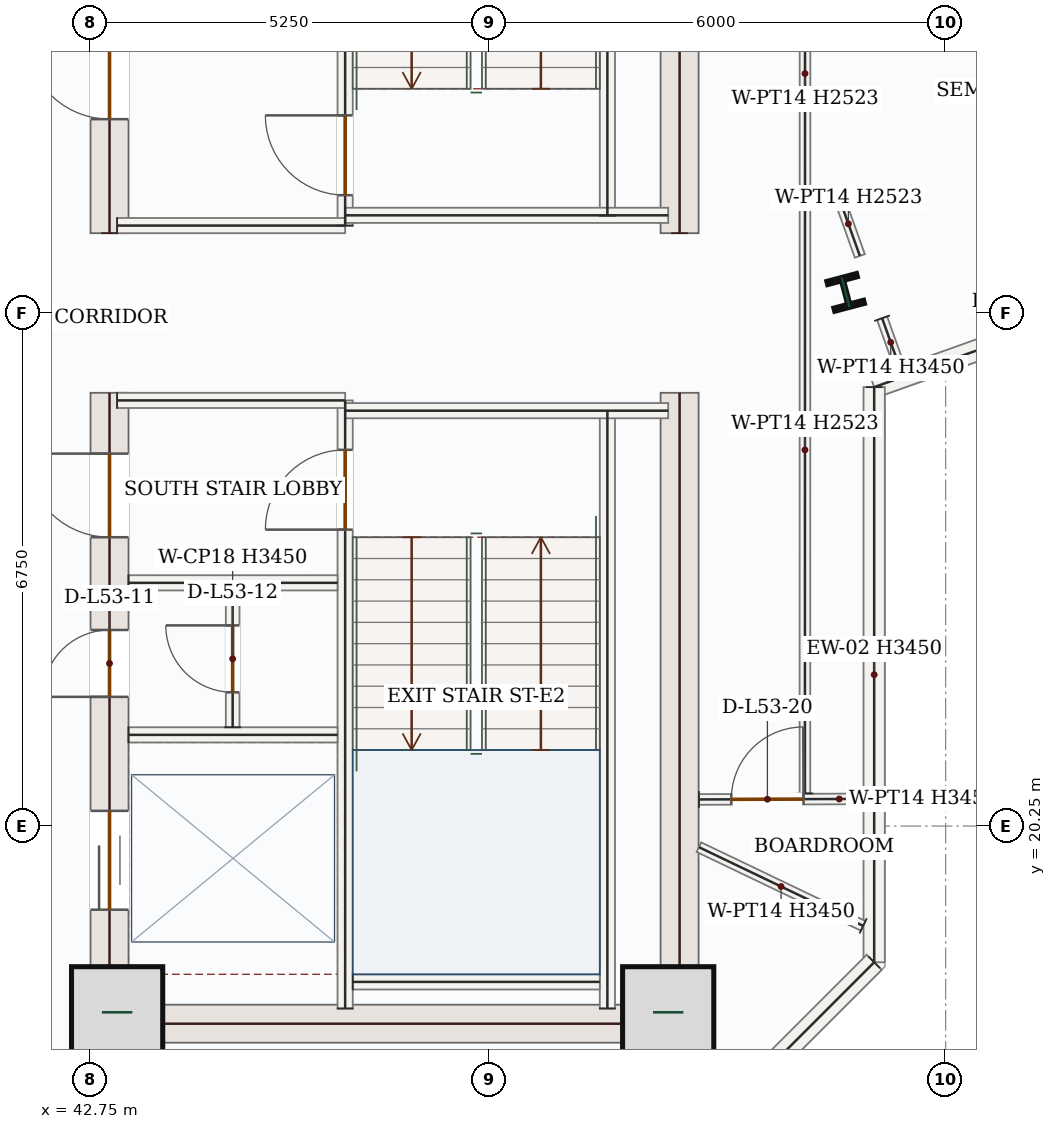
"""IFC4 building model, lengths in metres.
Left out: names, types, materials, properties, quantities, classifications, styles, units other than length and angle.
Written with IfcOpenShell. Run it as: python <this file> out.ifc"""

import sys

from ifc_helpers import new_model, si_unit, direction, frame, frame_2d, origin, origin_2d, place, context, subcontext, project, spatial, rectangle, i_section, extrude, source, transform, mapped, element, fill, save


model = new_model("IFC4")
c1 = context("Model", 3, precision=1e-05, world=origin(), true_north=direction((0.0, 1.0)))
c2 = subcontext(c1, "Body", "Model", "MODEL_VIEW")
j1 = project(units=[si_unit("LENGTHUNIT", "METRE"), si_unit("PLANEANGLEUNIT", "RADIAN")], contexts=[c1])
p1 = place(None, origin())
s1 = spatial("IfcSite", under=j1, at=p1, CompositionType="ELEMENT")
p2 = place(p1, origin())
s2 = spatial("IfcBuilding", under=s1, at=p2, CompositionType="ELEMENT")
p3 = place(p2, frame((0.0, 0.0, 225.3)))
s3 = spatial("IfcBuildingStorey", under=s2, at=p3, CompositionType="ELEMENT", Elevation=225.3)
p4 = place(p3, frame((43.0, 17.4, 0.0), z_axis=(0.0, 0.0, 1.0), x_axis=(0.0, 1.0, 0.0)))
e1 = element("IfcWall", 1, at=p4, inside=s3, PredefinedType="SHEAR", context=c2, shape_type="SweptSolid", body=[
    extrude(rectangle(XDim=8.55, YDim=0.5, at=frame_2d((4.275, 0.0))), origin(), (0.0, 0.0, 1.0), 3.45),
])
p5 = place(p4, frame((6.65, 0.0, 0.0)))
e2 = element("IfcOpeningElement", 2, at=p5, cuts=e1, PredefinedType="OPENING", context=c2, shape_type="SweptSolid", body=[
    extrude(rectangle(XDim=1.1, YDim=2.2, at=frame_2d((0.55, 1.1))), frame((0.0, 0.26, 0.0), z_axis=(0.0, -1.0, 0.0), x_axis=(1.0, 0.0, 0.0)), (0.0, 0.0, 1.0), 0.52),
])
p6 = place(p4, frame((1.75, 0.0, 0.0)))
e3 = element("IfcOpeningElement", 3, at=p6, cuts=e1, PredefinedType="OPENING", context=c2, shape_type="SweptSolid", body=[
    extrude(rectangle(XDim=1.3, YDim=2.2, at=frame_2d((0.65, 1.1))), frame((0.0, 0.26, 0.0), z_axis=(0.0, -1.0, 0.0), x_axis=(1.0, 0.0, 0.0)), (0.0, 0.0, 1.0), 0.52),
])
p7 = place(p4, frame((4.55, 0.0, 0.0)))
e4 = element("IfcOpeningElement", 4, at=p7, cuts=e1, PredefinedType="OPENING", context=c2, shape_type="SweptSolid", body=[
    extrude(rectangle(XDim=0.88, YDim=2.1, at=frame_2d((0.44, 1.05))), frame((0.0, 0.26, 0.0), z_axis=(0.0, -1.0, 0.0), x_axis=(1.0, 0.0, 0.0)), (0.0, 0.0, 1.0), 0.52),
])
p8 = place(p3, frame((43.0, 28.05, 0.0), z_axis=(0.0, 0.0, 1.0), x_axis=(0.0, 1.0, 0.0)))
e5 = element("IfcWall", 5, at=p8, inside=s3, PredefinedType="SHEAR", context=c2, shape_type="SweptSolid", body=[
    extrude(rectangle(XDim=8.55, YDim=0.5, at=frame_2d((4.275, 0.0))), origin(), (0.0, 0.0, 1.0), 3.45),
])
p9 = place(p8, frame((1.5, 0.0, 0.0)))
e6 = element("IfcOpeningElement", 6, at=p9, cuts=e5, PredefinedType="OPENING", context=c2, shape_type="SweptSolid", body=[
    extrude(rectangle(XDim=1.1, YDim=2.2, at=frame_2d((0.55, 1.1))), frame((0.0, 0.26, 0.0), z_axis=(0.0, -1.0, 0.0), x_axis=(1.0, 0.0, 0.0)), (0.0, 0.0, 1.0), 0.52),
])
m1 = source(origin(), c2, "Body", "SweptSolid", [
    extrude(rectangle(XDim=8.55, YDim=0.5, at=frame_2d((4.275, 0.0))), origin(), (0.0, 0.0, 1.0), 3.45),
])
for number, where, z_axis, x_axis in (
    (7, (50.5, 17.4, 0.0), (0.0, 0.0, 1.0), (0.0, 1.0, 0.0)),
    (8, (50.5, 28.05, 0.0), (0.0, 0.0, 1.0), (0.0, 1.0, 0.0)),
):
    element("IfcWall", number, at=place(p3, frame(where, z_axis=z_axis, x_axis=x_axis)), inside=s3, PredefinedType="SHEAR", context=c2, shape_type="MappedRepresentation", body=[
        mapped(m1, transform((0.0, 0.0, 0.0), x_axis=(1.0, 0.0, 0.0), y_axis=(0.0, 1.0, 0.0), z_axis=(0.0, 0.0, 1.0), scale=1.0)),
    ])
m2 = source(origin(), c2, "Body", "SweptSolid", [
    extrude(rectangle(XDim=7.0, YDim=0.5, at=frame_2d((3.5, 0.0))), origin(), (0.0, 0.0, 1.0), 3.45),
])
p10 = place(p3, frame((43.25, 17.65, 0.0), z_axis=(0.0, 0.0, 1.0), x_axis=(1.0, 0.0, 0.0)))
e9 = element("IfcWall", 9, at=p10, inside=s3, PredefinedType="SHEAR", context=c2, shape_type="MappedRepresentation", body=[
    mapped(m2, transform((0.0, 0.0, 0.0), x_axis=(1.0, 0.0, 0.0), y_axis=(0.0, 1.0, 0.0), z_axis=(0.0, 0.0, 1.0), scale=1.0)),
])
m3 = source(origin(), c2, "Body", "SweptSolid", [
    extrude(rectangle(XDim=1.2, YDim=1.2, at=origin_2d()), origin(), (0.0, 0.0, 1.0), 3.9),
])
for number, where, z_axis, x_axis in (
    (10, (43.1, 17.8, 0.0), (0.0, 0.0, 1.0), (1.0, 0.0, 0.0)),
    (11, (50.35, 17.8, 0.0), (0.0, 0.0, 1.0), (1.0, 0.0, 0.0)),
):
    element("IfcColumn", number, at=place(p3, frame(where, z_axis=z_axis, x_axis=x_axis)), inside=s3, PredefinedType="COLUMN", context=c2, shape_type="MappedRepresentation", body=[
        mapped(m3, transform((0.0, 0.0, 0.0), x_axis=(1.0, 0.0, 0.0), y_axis=(0.0, 1.0, 0.0), z_axis=(0.0, 0.0, 1.0), scale=1.0)),
    ])
m4 = source(origin(), c2, "Body", "SweptSolid", [
    extrude(i_section(OverallWidth=0.404, OverallDepth=0.407, WebThickness=0.027, FlangeThickness=0.044, FilletRadius=0.018, at=origin_2d()), origin(), (0.0, 0.0, 1.0), 3.9),
])
p11 = place(p3, frame((52.684, 27.271, 0.0), z_axis=(0.0, 0.0, 1.0), x_axis=(0.966823388604, 0.255445757936, 0.0)))
e12 = element("IfcColumn", 12, at=p11, inside=s3, PredefinedType="COLUMN", context=c2, shape_type="MappedRepresentation", body=[
    mapped(m4, transform((0.0, 0.0, 0.0), x_axis=(1.0, 0.0, 0.0), y_axis=(0.0, 1.0, 0.0), z_axis=(0.0, 0.0, 1.0), scale=1.0)),
])
m5 = source(origin(), c2, "Body", "SweptSolid", [
    extrude(rectangle(XDim=4.624, YDim=0.28, at=frame_2d((2.312, 0.0))), origin(), (0.0, 0.0, 1.0), 3.45),
])
p12 = place(p3, frame((57.414, 27.581, 0.0), z_axis=(0.0, 0.0, 1.0), x_axis=(-0.941673795185, -0.336527062004, 0.0)))
e13 = element("IfcWall", 13, at=p12, inside=s3, PredefinedType="SOLIDWALL", context=c2, shape_type="MappedRepresentation", body=[
    mapped(m5, transform((0.0, 0.0, 0.0), x_axis=(1.0, 0.0, 0.0), y_axis=(0.0, 1.0, 0.0), z_axis=(0.0, 0.0, 1.0), scale=1.0)),
])
m6 = source(origin(), c2, "Body", "SweptSolid", [
    extrude(rectangle(XDim=7.567, YDim=0.28, at=frame_2d((3.783, 0.0))), origin(), (0.0, 0.0, 1.0), 3.45),
])
p13 = place(p3, frame((53.06, 26.025, 0.0), z_axis=(0.0, 0.0, 1.0), x_axis=(0.0, -1.0, 0.0)))
e14 = element("IfcWall", 14, at=p13, inside=s3, PredefinedType="SOLIDWALL", context=c2, shape_type="MappedRepresentation", body=[
    mapped(m6, transform((0.0, 0.0, 0.0), x_axis=(1.0, 0.0, 0.0), y_axis=(0.0, 1.0, 0.0), z_axis=(0.0, 0.0, 1.0), scale=1.0)),
])
m7 = source(origin(), c2, "Body", "SweptSolid", [
    extrude(rectangle(XDim=5.258, YDim=0.28, at=frame_2d((2.629, 0.0))), origin(), (0.0, 0.0, 1.0), 3.45),
])
p14 = place(p3, frame((53.06, 18.458, 0.0), z_axis=(0.0, 0.0, 1.0), x_axis=(-0.707106781187, -0.707106781187, 0.0)))
e15 = element("IfcWall", 15, at=p14, inside=s3, PredefinedType="SOLIDWALL", context=c2, shape_type="MappedRepresentation", body=[
    mapped(m7, transform((0.0, 0.0, 0.0), x_axis=(1.0, 0.0, 0.0), y_axis=(0.0, 1.0, 0.0), z_axis=(0.0, 0.0, 1.0), scale=1.0)),
])
m8 = source(origin(), c2, "Body", "SweptSolid", [
    extrude(rectangle(XDim=7.87, YDim=0.2, at=frame_2d((3.935, 0.0))), origin(), (0.0, 0.0, 1.0), 3.45),
])
for number, where, z_axis, x_axis in (
    (16, (49.55, 17.85, 0.0), (0.0, 0.0, 1.0), (0.0, 1.0, 0.0)),
    (17, (49.55, 28.28, 0.0), (0.0, 0.0, 1.0), (0.0, 1.0, 0.0)),
):
    element("IfcWall", number, at=place(p3, frame(where, z_axis=z_axis, x_axis=x_axis)), inside=s3, PredefinedType="SOLIDWALL", context=c2, shape_type="MappedRepresentation", body=[
        mapped(m8, transform((0.0, 0.0, 0.0), x_axis=(1.0, 0.0, 0.0), y_axis=(0.0, 1.0, 0.0), z_axis=(0.0, 0.0, 1.0), scale=1.0)),
    ])
p15 = place(p3, frame((46.1, 17.85, 0.0), z_axis=(0.0, 0.0, 1.0), x_axis=(0.0, 1.0, 0.0)))
e18 = element("IfcWall", 18, at=p15, inside=s3, PredefinedType="SOLIDWALL", context=c2, shape_type="SweptSolid", body=[
    extrude(rectangle(XDim=8.0, YDim=0.2, at=frame_2d((4.0, 0.0))), origin(), (0.0, 0.0, 1.0), 3.45),
])
p16 = place(p15, frame((6.3, 0.0, 0.0)))
e19 = element("IfcOpeningElement", 19, at=p16, cuts=e18, PredefinedType="OPENING", context=c2, shape_type="SweptSolid", body=[
    extrude(rectangle(XDim=1.05, YDim=2.15, at=frame_2d((0.525, 1.075))), frame((0.0, 0.11, 0.0), z_axis=(0.0, -1.0, 0.0), x_axis=(1.0, 0.0, 0.0)), (0.0, 0.0, 1.0), 0.22),
])
p17 = place(p3, frame((46.1, 28.15, 0.0), z_axis=(0.0, 0.0, 1.0), x_axis=(0.0, 1.0, 0.0)))
e20 = element("IfcWall", 20, at=p17, inside=s3, PredefinedType="SOLIDWALL", context=c2, shape_type="SweptSolid", body=[
    extrude(rectangle(XDim=8.0, YDim=0.2, at=frame_2d((4.0, 0.0))), origin(), (0.0, 0.0, 1.0), 3.45),
])
p18 = place(p17, frame((0.4, 0.0, 0.0)))
e21 = element("IfcOpeningElement", 21, at=p18, cuts=e20, PredefinedType="OPENING", context=c2, shape_type="SweptSolid", body=[
    extrude(rectangle(XDim=1.05, YDim=2.15, at=frame_2d((0.525, 1.075))), frame((0.0, 0.11, 0.0), z_axis=(0.0, -1.0, 0.0), x_axis=(1.0, 0.0, 0.0)), (0.0, 0.0, 1.0), 0.22),
])
m9 = source(origin(), c2, "Body", "SweptSolid", [
    extrude(rectangle(XDim=3.0, YDim=0.2, at=frame_2d((1.5, 0.0))), origin(), (0.0, 0.0, 1.0), 3.45),
])
p19 = place(p3, frame((43.1, 25.85, 0.0), z_axis=(0.0, 0.0, 1.0), x_axis=(1.0, 0.0, 0.0)))
e22 = element("IfcWall", 22, at=p19, inside=s3, PredefinedType="SOLIDWALL", context=c2, shape_type="MappedRepresentation", body=[
    mapped(m9, transform((0.0, 0.0, 0.0), x_axis=(1.0, 0.0, 0.0), y_axis=(0.0, 1.0, 0.0), z_axis=(0.0, 0.0, 1.0), scale=1.0)),
])
m10 = source(origin(), c2, "Body", "SweptSolid", [
    extrude(rectangle(XDim=4.25, YDim=0.2, at=frame_2d((2.125, 0.0))), origin(), (0.0, 0.0, 1.0), 3.45),
])
p20 = place(p3, frame((46.1, 25.715, 0.0), z_axis=(0.0, 0.0, 1.0), x_axis=(1.0, 0.0, 0.0)))
e23 = element("IfcWall", 23, at=p20, inside=s3, PredefinedType="SOLIDWALL", context=c2, shape_type="MappedRepresentation", body=[
    mapped(m10, transform((0.0, 0.0, 0.0), x_axis=(1.0, 0.0, 0.0), y_axis=(0.0, 1.0, 0.0), z_axis=(0.0, 0.0, 1.0), scale=1.0)),
])
p21 = place(p3, frame((43.1, 28.15, 0.0), z_axis=(0.0, 0.0, 1.0), x_axis=(1.0, 0.0, 0.0)))
e24 = element("IfcWall", 24, at=p21, inside=s3, PredefinedType="SOLIDWALL", context=c2, shape_type="MappedRepresentation", body=[
    mapped(m9, transform((0.0, 0.0, 0.0), x_axis=(1.0, 0.0, 0.0), y_axis=(0.0, 1.0, 0.0), z_axis=(0.0, 0.0, 1.0), scale=1.0)),
])
p22 = place(p3, frame((46.1, 28.285, 0.0), z_axis=(0.0, 0.0, 1.0), x_axis=(1.0, 0.0, 0.0)))
e25 = element("IfcWall", 25, at=p22, inside=s3, PredefinedType="SOLIDWALL", context=c2, shape_type="MappedRepresentation", body=[
    mapped(m10, transform((0.0, 0.0, 0.0), x_axis=(1.0, 0.0, 0.0), y_axis=(0.0, 1.0, 0.0), z_axis=(0.0, 0.0, 1.0), scale=1.0)),
])
m11 = source(origin(), c2, "Body", "SweptSolid", [
    extrude(rectangle(XDim=3.25, YDim=0.2, at=frame_2d((1.625, 0.0))), origin(), (0.0, 0.0, 1.0), 3.45),
])
p23 = place(p3, frame((46.2, 18.2, 0.0), z_axis=(0.0, 0.0, 1.0), x_axis=(1.0, 0.0, 0.0)))
e26 = element("IfcWall", 26, at=p23, inside=s3, PredefinedType="SOLIDWALL", context=c2, shape_type="MappedRepresentation", body=[
    mapped(m11, transform((0.0, 0.0, 0.0), x_axis=(1.0, 0.0, 0.0), y_axis=(0.0, 1.0, 0.0), z_axis=(0.0, 0.0, 1.0), scale=1.0)),
])
m12 = source(origin(), c2, "Body", "SweptSolid", [
    extrude(rectangle(XDim=2.75, YDim=0.2, at=frame_2d((1.375, 0.0))), origin(), (0.0, 0.0, 1.0), 3.45),
])
for number, where, z_axis, x_axis in (
    (27, (43.25, 23.45, 0.0), (0.0, 0.0, 1.0), (1.0, 0.0, 0.0)),
    (28, (43.25, 21.45, 0.0), (0.0, 0.0, 1.0), (1.0, 0.0, 0.0)),
):
    element("IfcWall", number, at=place(p3, frame(where, z_axis=z_axis, x_axis=x_axis)), inside=s3, PredefinedType="SOLIDWALL", context=c2, shape_type="MappedRepresentation", body=[
        mapped(m12, transform((0.0, 0.0, 0.0), x_axis=(1.0, 0.0, 0.0), y_axis=(0.0, 1.0, 0.0), z_axis=(0.0, 0.0, 1.0), scale=1.0)),
    ])
p24 = place(p3, frame((44.62, 21.55, 0.0), z_axis=(0.0, 0.0, 1.0), x_axis=(0.0, 1.0, 0.0)))
e29 = element("IfcWall", 29, at=p24, inside=s3, PredefinedType="PARTITIONING", context=c2, shape_type="SweptSolid", body=[
    extrude(rectangle(XDim=1.8, YDim=0.18, at=frame_2d((0.9, 0.0))), origin(), (0.0, 0.0, 1.0), 3.45),
])
p25 = place(p24, frame((0.46, 0.0, 0.0)))
e30 = element("IfcOpeningElement", 30, at=p25, cuts=e29, PredefinedType="OPENING", context=c2, shape_type="SweptSolid", body=[
    extrude(rectangle(XDim=0.88, YDim=2.1, at=frame_2d((0.44, 1.05))), frame((0.0, 0.1, 0.0), z_axis=(0.0, -1.0, 0.0), x_axis=(1.0, 0.0, 0.0)), (0.0, 0.0, 1.0), 0.2),
])
p26 = place(p3, frame((50.755, 20.6, 0.0), z_axis=(0.0, 0.0, 1.0), x_axis=(0.999994277874, 0.003382930575, 0.0)))
e31 = element("IfcWall", 31, at=p26, inside=s3, PredefinedType="PARTITIONING", context=c2, shape_type="SweptSolid", body=[
    extrude(rectangle(XDim=2.165, YDim=0.14, at=frame_2d((1.083, 0.0))), origin(), (0.0, 0.0, 1.0), 3.45),
])
p27 = place(p26, frame((0.425, 0.0, 0.0)))
e32 = element("IfcOpeningElement", 32, at=p27, cuts=e31, PredefinedType="OPENING", context=c2, shape_type="SweptSolid", body=[
    extrude(rectangle(XDim=0.95, YDim=2.15, at=frame_2d((0.475, 1.075))), frame((0.0, 0.08, 0.0), z_axis=(0.0, -1.0, 0.0), x_axis=(1.0, 0.0, 0.0)), (0.0, 0.0, 1.0), 0.16),
])
m13 = source(origin(), c2, "Body", "SweptSolid", [
    extrude(rectangle(XDim=9.038, YDim=0.14, at=frame_2d((4.519, 0.0))), origin(), (0.0, 0.0, 1.0), 2.523),
])
p28 = place(p3, frame((52.149, 20.68, 0.0), z_axis=(0.0, 0.0, 1.0), x_axis=(0.000135065776, 0.999999990879, 0.0)))
e33 = element("IfcWall", 33, at=p28, inside=s3, PredefinedType="PARTITIONING", context=c2, shape_type="MappedRepresentation", body=[
    mapped(m13, transform((0.0, 0.0, 0.0), x_axis=(1.0, 0.0, 0.0), y_axis=(0.0, 1.0, 0.0), z_axis=(0.0, 0.0, 1.0), scale=1.0)),
])
m14 = source(origin(), c2, "Body", "SweptSolid", [
    extrude(rectangle(XDim=0.896, YDim=0.14, at=frame_2d((0.448, 0.0))), origin(), (0.0, 0.0, 1.0), 2.523),
])
p29 = place(p3, frame((52.57, 28.595, 0.0), z_axis=(0.0, 0.0, 1.0), x_axis=(0.336509001165, -0.941680249413, 0.0)))
e34 = element("IfcWall", 34, at=p29, inside=s3, PredefinedType="PARTITIONING", context=c2, shape_type="MappedRepresentation", body=[
    mapped(m14, transform((0.0, 0.0, 0.0), x_axis=(1.0, 0.0, 0.0), y_axis=(0.0, 1.0, 0.0), z_axis=(0.0, 0.0, 1.0), scale=1.0)),
])
m15 = source(origin(), c2, "Body", "SweptSolid", [
    extrude(rectangle(XDim=0.674, YDim=0.14, at=frame_2d((0.337, 0.0))), origin(), (0.0, 0.0, 1.0), 3.45),
])
p30 = place(p3, frame((53.164, 26.931, 0.0), z_axis=(0.0, 0.0, 1.0), x_axis=(0.336588856473, -0.941651709337, 0.0)))
e35 = element("IfcWall", 35, at=p30, inside=s3, PredefinedType="PARTITIONING", context=c2, shape_type="MappedRepresentation", body=[
    mapped(m15, transform((0.0, 0.0, 0.0), x_axis=(1.0, 0.0, 0.0), y_axis=(0.0, 1.0, 0.0), z_axis=(0.0, 0.0, 1.0), scale=1.0)),
])
m16 = source(origin(), c2, "Body", "SweptSolid", [
    extrude(rectangle(XDim=2.395, YDim=0.14, at=frame_2d((1.198, 0.0))), origin(), (0.0, 0.0, 1.0), 3.45),
])
p31 = place(p3, frame((52.915, 18.937, 0.0), z_axis=(0.0, 0.0, 1.0), x_axis=(-0.90180278892, 0.432147810242, 0.0)))
e36 = element("IfcWall", 36, at=p31, inside=s3, PredefinedType="PARTITIONING", context=c2, shape_type="MappedRepresentation", body=[
    mapped(m16, transform((0.0, 0.0, 0.0), x_axis=(1.0, 0.0, 0.0), y_axis=(0.0, 1.0, 0.0), z_axis=(0.0, 0.0, 1.0), scale=1.0)),
])
p32 = place(p3, frame((52.15, 29.829, 0.0), z_axis=(0.0, 0.0, 1.0), x_axis=(0.0, 1.0, 0.0)))
e37 = element("IfcWall", 37, at=p32, inside=s3, PredefinedType="PARTITIONING", context=c2, shape_type="SweptSolid", body=[
    extrude(rectangle(XDim=1.966, YDim=0.14, at=frame_2d((0.983, 0.0))), origin(), (0.0, 0.0, 1.0), 2.523),
])
p33 = place(p32, frame((0.792, 0.0, 0.0)))
e38 = element("IfcOpeningElement", 38, at=p33, cuts=e37, PredefinedType="OPENING", context=c2, shape_type="SweptSolid", body=[
    extrude(rectangle(XDim=0.95, YDim=2.15, at=frame_2d((0.475, 1.075))), frame((0.0, 0.08, 0.0), z_axis=(0.0, -1.0, 0.0), x_axis=(1.0, 0.0, 0.0)), (0.0, 0.0, 1.0), 0.16),
])
m17 = source(origin(), c2, "Body", "SweptSolid", [
    extrude(rectangle(XDim=1.05, YDim=2.15, at=frame_2d((0.525, 1.075))), frame((0.0, 0.025, 0.0), z_axis=(0.0, -1.0, 0.0), x_axis=(1.0, 0.0, 0.0)), (0.0, 0.0, 1.0), 0.05),
])
p34 = place(p18, origin())
e39 = element("IfcDoor", 39, at=p34, inside=s3, OperationType="SINGLE_SWING_RIGHT", PredefinedType="DOOR", context=c2, shape_type="MappedRepresentation", body=[
    mapped(m17, transform((0.0, 0.0, 0.0), x_axis=(1.0, 0.0, 0.0), y_axis=(0.0, 1.0, 0.0), z_axis=(0.0, 0.0, 1.0), scale=1.0)),
])
fill(e21, e39)
p35 = place(p16, origin())
e40 = element("IfcDoor", 40, at=p35, inside=s3, OperationType="SINGLE_SWING_LEFT", PredefinedType="DOOR", context=c2, shape_type="MappedRepresentation", body=[
    mapped(m17, transform((0.0, 0.0, 0.0), x_axis=(1.0, 0.0, 0.0), y_axis=(0.0, 1.0, 0.0), z_axis=(0.0, 0.0, 1.0), scale=1.0)),
])
fill(e19, e40)
m18 = source(origin(), c2, "Body", "SweptSolid", [
    extrude(rectangle(XDim=1.1, YDim=2.2, at=frame_2d((0.55, 1.1))), frame((0.0, 0.025, 0.0), z_axis=(0.0, -1.0, 0.0), x_axis=(1.0, 0.0, 0.0)), (0.0, 0.0, 1.0), 0.05),
])
p36 = place(p9, origin())
e41 = element("IfcDoor", 41, at=p36, inside=s3, OperationType="SINGLE_SWING_RIGHT", PredefinedType="DOOR", context=c2, shape_type="MappedRepresentation", body=[
    mapped(m18, transform((0.0, 0.0, 0.0), x_axis=(1.0, 0.0, 0.0), y_axis=(0.0, 1.0, 0.0), z_axis=(0.0, 0.0, 1.0), scale=1.0)),
])
fill(e6, e41)
p37 = place(p5, origin())
e42 = element("IfcDoor", 42, at=p37, inside=s3, OperationType="SINGLE_SWING_RIGHT", PredefinedType="DOOR", context=c2, shape_type="MappedRepresentation", body=[
    mapped(m18, transform((0.0, 0.0, 0.0), x_axis=(1.0, 0.0, 0.0), y_axis=(0.0, 1.0, 0.0), z_axis=(0.0, 0.0, 1.0), scale=1.0)),
])
fill(e2, e42)
m19 = source(origin(), c2, "Body", "SweptSolid", [
    extrude(rectangle(XDim=1.3, YDim=2.2, at=frame_2d((0.65, 1.1))), frame((0.0, 0.025, 0.0), z_axis=(0.0, -1.0, 0.0), x_axis=(1.0, 0.0, 0.0)), (0.0, 0.0, 1.0), 0.05),
])
p38 = place(p6, origin())
e43 = element("IfcDoor", 43, at=p38, inside=s3, OperationType="DOUBLE_DOOR_SLIDING", PredefinedType="DOOR", context=c2, shape_type="MappedRepresentation", body=[
    mapped(m19, transform((0.0, 0.0, 0.0), x_axis=(1.0, 0.0, 0.0), y_axis=(0.0, 1.0, 0.0), z_axis=(0.0, 0.0, 1.0), scale=1.0)),
])
fill(e3, e43)
m20 = source(origin(), c2, "Body", "SweptSolid", [
    extrude(rectangle(XDim=0.88, YDim=2.1, at=frame_2d((0.44, 1.05))), frame((0.0, 0.025, 0.0), z_axis=(0.0, -1.0, 0.0), x_axis=(1.0, 0.0, 0.0)), (0.0, 0.0, 1.0), 0.05),
])
p39 = place(p7, origin())
e44 = element("IfcDoor", 44, at=p39, inside=s3, OperationType="SINGLE_SWING_LEFT", PredefinedType="DOOR", context=c2, shape_type="MappedRepresentation", body=[
    mapped(m20, transform((0.0, 0.0, 0.0), x_axis=(1.0, 0.0, 0.0), y_axis=(0.0, 1.0, 0.0), z_axis=(0.0, 0.0, 1.0), scale=1.0)),
])
fill(e4, e44)
p40 = place(p25, origin())
e45 = element("IfcDoor", 45, at=p40, inside=s3, OperationType="SINGLE_SWING_RIGHT", PredefinedType="DOOR", context=c2, shape_type="MappedRepresentation", body=[
    mapped(m20, transform((0.0, 0.0, 0.0), x_axis=(1.0, 0.0, 0.0), y_axis=(0.0, 1.0, 0.0), z_axis=(0.0, 0.0, 1.0), scale=1.0)),
])
fill(e30, e45)
m21 = source(origin(), c2, "Body", "SweptSolid", [
    extrude(rectangle(XDim=0.95, YDim=2.15, at=frame_2d((0.475, 1.075))), frame((0.0, 0.025, 0.0), z_axis=(0.0, -1.0, 0.0), x_axis=(1.0, 0.0, 0.0)), (0.0, 0.0, 1.0), 0.05),
])
p41 = place(p27, origin())
e46 = element("IfcDoor", 46, at=p41, inside=s3, OperationType="SINGLE_SWING_RIGHT", PredefinedType="DOOR", context=c2, shape_type="MappedRepresentation", body=[
    mapped(m21, transform((0.0, 0.0, 0.0), x_axis=(1.0, 0.0, 0.0), y_axis=(0.0, 1.0, 0.0), z_axis=(0.0, 0.0, 1.0), scale=1.0)),
])
fill(e32, e46)
save(model, sys.argv[1])
